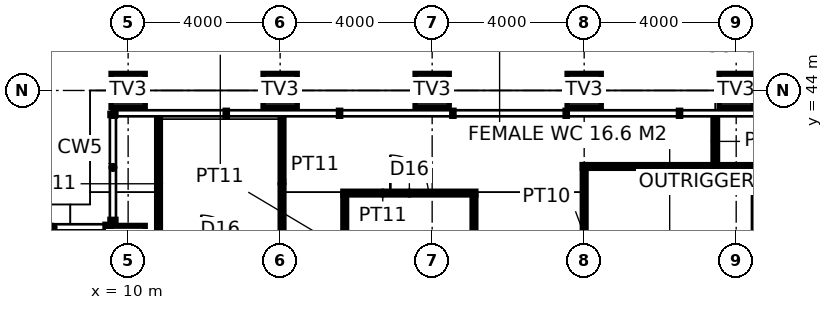
"""IFC4 building model, lengths in metres.
Left out: names, types, materials, properties, quantities, classifications, styles, units other than length and angle.
Written with IfcOpenShell. Run it as: python <this file> out.ifc"""

import sys

from ifc_helpers import new_model, si_unit, direction, frame, frame_2d, origin, origin_2d, place, context, subcontext, project, spatial, rectangle, hollow_rectangle, extrude, element, fill, save


model = new_model("IFC4")
c1 = context("Model", 3, precision=1e-05, world=origin(), true_north=direction((0.0, 1.0)))
c2 = subcontext(c1, "Body", "Model", "MODEL_VIEW")
j1 = project(units=[si_unit("LENGTHUNIT", "METRE"), si_unit("PLANEANGLEUNIT", "RADIAN")], contexts=[c1])
p1 = place(None, origin())
s1 = spatial("IfcSite", under=j1, at=p1, CompositionType="ELEMENT")
p2 = place(p1, origin())
s2 = spatial("IfcBuilding", under=s1, at=p2, CompositionType="ELEMENT")
p3 = place(p2, frame((0.0, 0.0, 270.2)))
s3 = spatial("IfcBuildingStorey", under=s2, at=p3, CompositionType="ELEMENT", Elevation=270.2)
for number, where, z_axis, x_axis in (
    (1, (10.0, 44.0, 0.0), (0.0, 0.0, 1.0), (1.0, 0.0, 0.0)),
    (2, (14.0, 44.0, 0.0), (0.0, 0.0, 1.0), (1.0, 0.0, 0.0)),
    (3, (18.0, 44.0, 0.0), (0.0, 0.0, 1.0), (1.0, 0.0, 0.0)),
    (4, (22.0, 44.0, 0.0), (0.0, 0.0, 1.0), (1.0, 0.0, 0.0)),
    (5, (26.0, 44.0, 0.0), (0.0, 0.0, 1.0), (1.0, 0.0, 0.0)),
    (6, (10.0, 40.0, 0.0), (0.0, 0.0, 1.0), (1.0, 0.0, 0.0)),
):
    element("IfcColumn", number, at=place(p3, frame(where, z_axis=z_axis, x_axis=x_axis)), inside=s3, PredefinedType="USERDEFINED", context=c2, shape_type="SweptSolid", body=[
        extrude(hollow_rectangle(XDim=0.9, YDim=0.9, WallThickness=0.08, at=origin_2d()), origin(), (0.0, 0.0, 1.0), 4.0),
    ])
p4 = place(p3, frame((22.0, 38.375, 0.0), z_axis=(0.0, 0.0, 1.0), x_axis=(0.0, 1.0, 0.0)))
e7 = element("IfcWall", 7, at=p4, inside=s3, PredefinedType="PARTITIONING", context=c2, shape_type="SweptSolid", body=[
    extrude(rectangle(XDim=3.675, YDim=0.1, at=frame_2d((1.837, 0.0))), origin(), (0.0, 0.0, 1.0), 2.85),
])
p5 = place(p3, frame((21.95, 42.0, 0.0), z_axis=(0.0, 0.0, 1.0), x_axis=(1.0, 0.0, 0.0)))
e8 = element("IfcWall", 8, at=p5, inside=s3, PredefinedType="PARTITIONING", context=c2, shape_type="SweptSolid", body=[
    extrude(rectangle(XDim=12.1, YDim=0.1, at=frame_2d((6.05, 0.0))), origin(), (0.0, 0.0, 1.0), 3.85),
])
p6 = place(p3, frame((25.45, 42.0, 0.0), z_axis=(0.0, 0.0, 1.0), x_axis=(0.0, 1.0, 0.0)))
e9 = element("IfcWall", 9, at=p6, inside=s3, PredefinedType="PARTITIONING", context=c2, shape_type="SweptSolid", body=[
    extrude(rectangle(XDim=1.32, YDim=0.12, at=frame_2d((0.66, 0.0))), origin(), (0.0, 0.0, 1.0), 2.65),
])
p7 = place(p3, frame((15.65, 41.3, 0.0), z_axis=(0.0, 0.0, 1.0), x_axis=(1.0, 0.0, 0.0)))
e10 = element("IfcWall", 10, at=p7, inside=s3, PredefinedType="PARTITIONING", context=c2, shape_type="SweptSolid", body=[
    extrude(rectangle(XDim=3.5, YDim=0.1, at=frame_2d((1.75, 0.0))), origin(), (0.0, 0.0, 1.0), 3.85),
])
p8 = place(p7, frame((1.25, 0.0, 0.0)))
e11 = element("IfcOpeningElement", 11, at=p8, cuts=e10, PredefinedType="OPENING", context=c2, shape_type="SweptSolid", body=[
    extrude(rectangle(XDim=1.0, YDim=2.2, at=frame_2d((0.5, 1.1))), frame((0.0, 0.06, 0.0), z_axis=(0.0, -1.0, 0.0), x_axis=(1.0, 0.0, 0.0)), (0.0, 0.0, 1.0), 0.12),
])
p9 = place(p3, frame((10.8, 39.77, 0.0), z_axis=(0.0, 0.0, 1.0), x_axis=(0.0, 1.0, 0.0)))
e12 = element("IfcWall", 12, at=p9, inside=s3, PredefinedType="PARTITIONING", context=c2, shape_type="SweptSolid", body=[
    extrude(rectangle(XDim=3.55, YDim=0.1, at=frame_2d((1.775, 0.0))), origin(), (0.0, 0.0, 1.0), 3.85),
])
p10 = place(p3, frame((14.05, 39.77, 0.0), z_axis=(0.0, 0.0, 1.0), x_axis=(0.0, 1.0, 0.0)))
e13 = element("IfcWall", 13, at=p10, inside=s3, PredefinedType="PARTITIONING", context=c2, shape_type="SweptSolid", body=[
    extrude(rectangle(XDim=3.55, YDim=0.1, at=frame_2d((1.775, 0.0))), origin(), (0.0, 0.0, 1.0), 2.85),
])
for number, where, z_axis, x_axis in (
    (14, (15.7, 38.375, 0.0), (0.0, 0.0, 1.0), (0.0, 1.0, 0.0)),
    (15, (19.1, 38.375, 0.0), (0.0, 0.0, 1.0), (0.0, 1.0, 0.0)),
):
    element("IfcWall", number, at=place(p3, frame(where, z_axis=z_axis, x_axis=x_axis)), inside=s3, PredefinedType="PARTITIONING", context=c2, shape_type="SweptSolid", body=[
        extrude(rectangle(XDim=2.875, YDim=0.1, at=frame_2d((1.438, 0.0))), origin(), (0.0, 0.0, 1.0), 3.85),
    ])
p11 = place(p3, frame((8.48, 35.25, 0.0), z_axis=(0.0, 0.0, 1.0), x_axis=(0.0, 1.0, 0.0)))
e16 = element("IfcWall", 16, at=p11, inside=s3, PredefinedType="PARTITIONING", context=c2, shape_type="SweptSolid", body=[
    extrude(rectangle(XDim=5.07, YDim=0.1, at=frame_2d((2.535, 0.0))), origin(), (0.0, 0.0, 1.0), 3.85),
])
p12 = place(p11, frame((2.235, 0.0, 0.0)))
e17 = element("IfcOpeningElement", 17, at=p12, cuts=e16, PredefinedType="OPENING", context=c2, shape_type="SweptSolid", body=[
    extrude(rectangle(XDim=1.0, YDim=2.2, at=frame_2d((0.5, 1.1))), frame((0.0, 0.06, 0.0), z_axis=(0.0, -1.0, 0.0), x_axis=(1.0, 0.0, 0.0)), (0.0, 0.0, 1.0), 0.12),
])
p13 = place(p8, origin())
e18 = element("IfcDoor", 18, at=p13, inside=s3, OperationType="SINGLE_SWING_LEFT", PredefinedType="DOOR", context=c2, shape_type="SweptSolid", body=[
    extrude(rectangle(XDim=1.0, YDim=2.2, at=frame_2d((0.5, 1.1))), frame((0.0, 0.025, 0.0), z_axis=(0.0, -1.0, 0.0), x_axis=(1.0, 0.0, 0.0)), (0.0, 0.0, 1.0), 0.05),
])
fill(e11, e18)
save(model, sys.argv[1])
